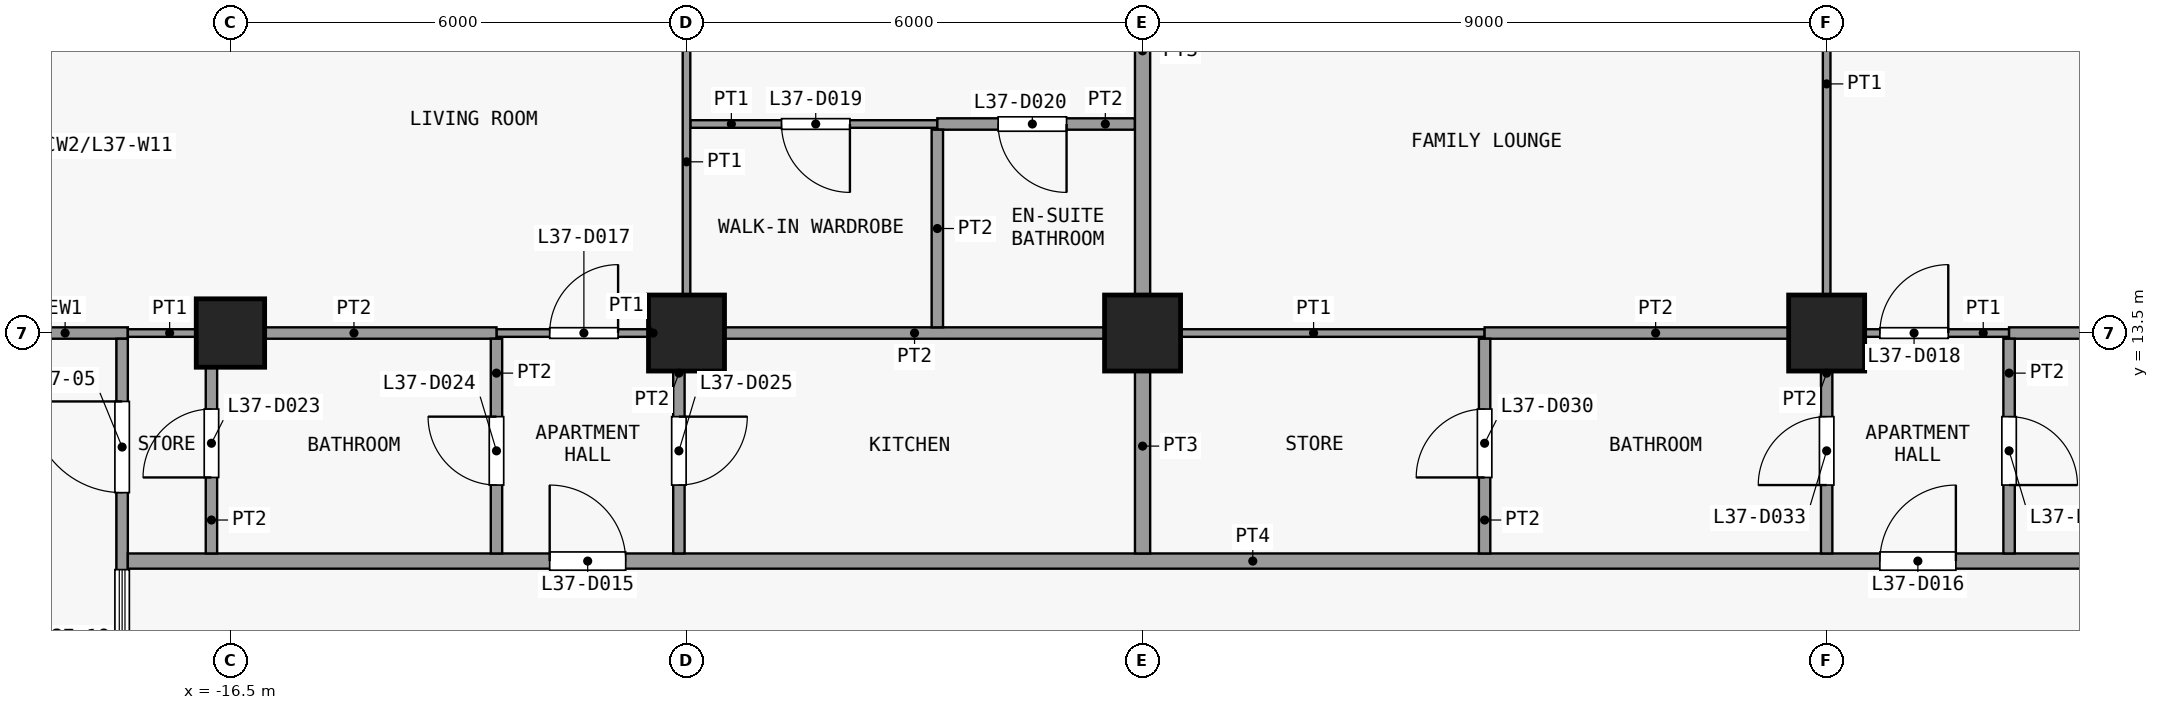
"""IFC4 building model, lengths in metres.
Left out: names, types, materials, properties, quantities, classifications, styles, units other than length and angle.
Written with IfcOpenShell. Run it as: python <this file> out.ifc"""

import sys

from ifc_helpers import new_model, si_unit, direction, frame, frame_2d, origin, origin_2d, place, context, subcontext, project, spatial, rectangle, extrude, element, fill, save


model = new_model("IFC4")
c1 = context("Model", 3, precision=1e-05, world=origin(), true_north=direction((0.0, 1.0)))
c2 = subcontext(c1, "Body", "Model", "MODEL_VIEW")
j1 = project(units=[si_unit("LENGTHUNIT", "METRE"), si_unit("PLANEANGLEUNIT", "RADIAN")], contexts=[c1])
p1 = place(None, origin())
s1 = spatial("IfcSite", under=j1, at=p1, CompositionType="ELEMENT")
p2 = place(p1, origin())
s2 = spatial("IfcBuilding", under=s1, at=p2, CompositionType="ELEMENT")
p3 = place(p2, frame((0.0, 0.0, 152.9)))
s3 = spatial("IfcBuildingStorey", under=s2, at=p3, CompositionType="ELEMENT", Elevation=152.9)
p4 = place(p3, frame((-16.5, 13.5, 0.0), z_axis=(0.0, 0.0, 1.0), x_axis=(1.0, 0.0, 0.0)))
e1 = element("IfcColumn", 1, at=p4, inside=s3, PredefinedType="COLUMN", context=c2, shape_type="SweptSolid", body=[
    extrude(rectangle(XDim=0.9, YDim=0.9, at=origin_2d()), origin(), (0.0, 0.0, 1.0), 3.6),
])
for number, where, z_axis, x_axis in (
    (2, (-10.5, 13.5, 0.0), (0.0, 0.0, 1.0), (1.0, 0.0, 0.0)),
    (3, (-4.5, 13.5, 0.0), (0.0, 0.0, 1.0), (1.0, 0.0, 0.0)),
    (4, (4.5, 13.5, 0.0), (0.0, 0.0, 1.0), (1.0, 0.0, 0.0)),
):
    element("IfcColumn", number, at=place(p3, frame(where, z_axis=z_axis, x_axis=x_axis)), inside=s3, PredefinedType="COLUMN", context=c2, shape_type="SweptSolid", body=[
        extrude(rectangle(XDim=1.0, YDim=1.0, at=origin_2d()), origin(), (0.0, 0.0, 1.0), 3.6),
    ])
p5 = place(p3, frame((-17.85, 13.5, 0.0), z_axis=(0.0, 0.0, 1.0), x_axis=(-1.0, 0.0, 0.0)))
e5 = element("IfcWall", 5, at=p5, inside=s3, PredefinedType="SOLIDWALL", context=c2, shape_type="SweptSolid", body=[
    extrude(rectangle(XDim=1.65, YDim=0.15, at=frame_2d((0.825, 0.0))), origin(), (0.0, 0.0, 1.0), 3.3),
])
p6 = place(p3, frame((-17.925, 7.575, 0.0), z_axis=(0.0, 0.0, 1.0), x_axis=(0.0, 1.0, 0.0)))
e6 = element("IfcWall", 6, at=p6, inside=s3, PredefinedType="SOLIDWALL", context=c2, shape_type="SweptSolid", body=[
    extrude(rectangle(XDim=5.85, YDim=0.15, at=frame_2d((2.925, 0.0))), origin(), (0.0, 0.0, 1.0), 3.3),
])
p7 = place(p6, frame((3.825, 0.0, 0.0)))
e7 = element("IfcOpeningElement", 7, at=p7, cuts=e6, PredefinedType="OPENING", context=c2, shape_type="SweptSolid", body=[
    extrude(rectangle(XDim=1.2, YDim=2.4, at=frame_2d((0.6, 1.2))), frame((0.0, 0.085, 0.0), z_axis=(0.0, -1.0, 0.0), x_axis=(1.0, 0.0, 0.0)), (0.0, 0.0, 1.0), 0.17),
])
p8 = place(p6, frame((1.012, 0.0, 0.9)))
e8 = element("IfcOpeningElement", 8, at=p8, cuts=e6, PredefinedType="OPENING", context=c2, shape_type="SweptSolid", body=[
    extrude(rectangle(XDim=1.8, YDim=2.1, at=frame_2d((0.9, 1.05))), frame((0.0, 0.085, 0.0), z_axis=(0.0, -1.0, 0.0), x_axis=(1.0, 0.0, 0.0)), (0.0, 0.0, 1.0), 0.17),
])
p9 = place(p3, frame((-17.85, 10.5, 0.0), z_axis=(0.0, 0.0, 1.0), x_axis=(1.0, 0.0, 0.0)))
e9 = element("IfcWall", 9, at=p9, inside=s3, PredefinedType="PARTITIONING", context=c2, shape_type="SweptSolid", body=[
    extrude(rectangle(XDim=37.2, YDim=0.2, at=frame_2d((18.6, 0.0))), origin(), (0.0, 0.0, 1.0), 3.3),
])
p10 = place(p9, frame((5.55, 0.0, 0.0)))
e10 = element("IfcOpeningElement", 10, at=p10, cuts=e9, PredefinedType="OPENING", context=c2, shape_type="SweptSolid", body=[
    extrude(rectangle(XDim=1.0, YDim=2.1, at=frame_2d((0.5, 1.05))), frame((0.0, 0.11, 0.0), z_axis=(0.0, -1.0, 0.0), x_axis=(1.0, 0.0, 0.0)), (0.0, 0.0, 1.0), 0.22),
])
p11 = place(p9, frame((23.05, 0.0, 0.0)))
e11 = element("IfcOpeningElement", 11, at=p11, cuts=e9, PredefinedType="OPENING", context=c2, shape_type="SweptSolid", body=[
    extrude(rectangle(XDim=1.0, YDim=2.1, at=frame_2d((0.5, 1.05))), frame((0.0, 0.11, 0.0), z_axis=(0.0, -1.0, 0.0), x_axis=(1.0, 0.0, 0.0)), (0.0, 0.0, 1.0), 0.22),
])
p12 = place(p3, frame((-17.85, 13.5, 0.0), z_axis=(0.0, 0.0, 1.0), x_axis=(1.0, 0.0, 0.0)))
e12 = element("IfcWall", 12, at=p12, inside=s3, PredefinedType="PARTITIONING", context=c2, shape_type="SweptSolid", body=[
    extrude(rectangle(XDim=1.1, YDim=0.1, at=frame_2d((0.55, 0.0))), origin(), (0.0, 0.0, 1.0), 3.3),
])
p13 = place(p3, frame((-13.0, 13.5, 0.0), z_axis=(0.0, 0.0, 1.0), x_axis=(1.0, 0.0, 0.0)))
e13 = element("IfcWall", 13, at=p13, inside=s3, PredefinedType="PARTITIONING", context=c2, shape_type="SweptSolid", body=[
    extrude(rectangle(XDim=2.4, YDim=0.1, at=frame_2d((1.2, 0.0))), origin(), (0.0, 0.0, 1.0), 3.3),
])
p14 = place(p13, frame((0.7, 0.0, 0.0)))
e14 = element("IfcOpeningElement", 14, at=p14, cuts=e13, PredefinedType="OPENING", context=c2, shape_type="SweptSolid", body=[
    extrude(rectangle(XDim=0.9, YDim=2.1, at=frame_2d((0.45, 1.05))), frame((0.0, 0.06, 0.0), z_axis=(0.0, -1.0, 0.0), x_axis=(1.0, 0.0, 0.0)), (0.0, 0.0, 1.0), 0.12),
])
p15 = place(p3, frame((-4.5, 13.5, 0.0), z_axis=(0.0, 0.0, 1.0), x_axis=(1.0, 0.0, 0.0)))
e15 = element("IfcWall", 15, at=p15, inside=s3, PredefinedType="PARTITIONING", context=c2, shape_type="SweptSolid", body=[
    extrude(rectangle(XDim=4.5, YDim=0.1, at=frame_2d((2.25, 0.0))), origin(), (0.0, 0.0, 1.0), 3.3),
])
p16 = place(p3, frame((4.5, 13.5, 0.0), z_axis=(0.0, 0.0, 1.0), x_axis=(1.0, 0.0, 0.0)))
e16 = element("IfcWall", 16, at=p16, inside=s3, PredefinedType="PARTITIONING", context=c2, shape_type="SweptSolid", body=[
    extrude(rectangle(XDim=2.4, YDim=0.1, at=frame_2d((1.2, 0.0))), origin(), (0.0, 0.0, 1.0), 3.3),
])
p17 = place(p16, frame((0.7, 0.0, 0.0)))
e17 = element("IfcOpeningElement", 17, at=p17, cuts=e16, PredefinedType="OPENING", context=c2, shape_type="SweptSolid", body=[
    extrude(rectangle(XDim=0.9, YDim=2.1, at=frame_2d((0.45, 1.05))), frame((0.0, 0.06, 0.0), z_axis=(0.0, -1.0, 0.0), x_axis=(1.0, 0.0, 0.0)), (0.0, 0.0, 1.0), 0.12),
])
p18 = place(p3, frame((-16.75, 13.5, 0.0), z_axis=(0.0, 0.0, 1.0), x_axis=(1.0, 0.0, 0.0)))
e18 = element("IfcWall", 18, at=p18, inside=s3, PredefinedType="PARTITIONING", context=c2, shape_type="SweptSolid", body=[
    extrude(rectangle(XDim=3.75, YDim=0.15, at=frame_2d((1.875, 0.0))), origin(), (0.0, 0.0, 1.0), 3.3),
])
p19 = place(p3, frame((-10.5, 13.5, 0.0), z_axis=(0.0, 0.0, 1.0), x_axis=(1.0, 0.0, 0.0)))
e19 = element("IfcWall", 19, at=p19, inside=s3, PredefinedType="PARTITIONING", context=c2, shape_type="SweptSolid", body=[
    extrude(rectangle(XDim=6.0, YDim=0.15, at=frame_2d((3.0, 0.0))), origin(), (0.0, 0.0, 1.0), 3.3),
])
p20 = place(p3, frame((0.0, 13.5, 0.0), z_axis=(0.0, 0.0, 1.0), x_axis=(1.0, 0.0, 0.0)))
e20 = element("IfcWall", 20, at=p20, inside=s3, PredefinedType="PARTITIONING", context=c2, shape_type="SweptSolid", body=[
    extrude(rectangle(XDim=4.5, YDim=0.15, at=frame_2d((2.25, 0.0))), origin(), (0.0, 0.0, 1.0), 3.3),
])
p21 = place(p3, frame((6.9, 13.5, 0.0), z_axis=(0.0, 0.0, 1.0), x_axis=(1.0, 0.0, 0.0)))
e21 = element("IfcWall", 21, at=p21, inside=s3, PredefinedType="PARTITIONING", context=c2, shape_type="SweptSolid", body=[
    extrude(rectangle(XDim=10.3, YDim=0.15, at=frame_2d((5.15, 0.0))), origin(), (0.0, 0.0, 1.0), 3.3),
])
p22 = place(p3, frame((-10.45, 16.25, 0.0), z_axis=(0.0, 0.0, 1.0), x_axis=(1.0, 0.0, 0.0)))
e22 = element("IfcWall", 22, at=p22, inside=s3, PredefinedType="PARTITIONING", context=c2, shape_type="SweptSolid", body=[
    extrude(rectangle(XDim=3.25, YDim=0.1, at=frame_2d((1.625, 0.0))), origin(), (0.0, 0.0, 1.0), 3.3),
])
p23 = place(p22, frame((1.2, 0.0, 0.0)))
e23 = element("IfcOpeningElement", 23, at=p23, cuts=e22, PredefinedType="OPENING", context=c2, shape_type="SweptSolid", body=[
    extrude(rectangle(XDim=0.9, YDim=2.1, at=frame_2d((0.45, 1.05))), frame((0.0, 0.06, 0.0), z_axis=(0.0, -1.0, 0.0), x_axis=(1.0, 0.0, 0.0)), (0.0, 0.0, 1.0), 0.12),
])
p24 = place(p3, frame((-7.2, 16.25, 0.0), z_axis=(0.0, 0.0, 1.0), x_axis=(1.0, 0.0, 0.0)))
e24 = element("IfcWall", 24, at=p24, inside=s3, PredefinedType="PARTITIONING", context=c2, shape_type="SweptSolid", body=[
    extrude(rectangle(XDim=2.6, YDim=0.15, at=frame_2d((1.3, 0.0))), origin(), (0.0, 0.0, 1.0), 3.3),
])
p25 = place(p24, frame((0.8, 0.0, 0.0)))
e25 = element("IfcOpeningElement", 25, at=p25, cuts=e24, PredefinedType="OPENING", context=c2, shape_type="SweptSolid", body=[
    extrude(rectangle(XDim=0.9, YDim=2.1, at=frame_2d((0.45, 1.05))), frame((0.0, 0.085, 0.0), z_axis=(0.0, -1.0, 0.0), x_axis=(1.0, 0.0, 0.0)), (0.0, 0.0, 1.0), 0.17),
])
p26 = place(p3, frame((-16.75, 10.6, 0.0), z_axis=(0.0, 0.0, 1.0), x_axis=(0.0, 1.0, 0.0)))
e26 = element("IfcWall", 26, at=p26, inside=s3, PredefinedType="PARTITIONING", context=c2, shape_type="SweptSolid", body=[
    extrude(rectangle(XDim=2.825, YDim=0.15, at=frame_2d((1.413, 0.0))), origin(), (0.0, 0.0, 1.0), 3.3),
])
p27 = place(p26, frame((1.0, 0.0, 0.0)))
e27 = element("IfcOpeningElement", 27, at=p27, cuts=e26, PredefinedType="OPENING", context=c2, shape_type="SweptSolid", body=[
    extrude(rectangle(XDim=0.9, YDim=2.1, at=frame_2d((0.45, 1.05))), frame((0.0, 0.085, 0.0), z_axis=(0.0, -1.0, 0.0), x_axis=(1.0, 0.0, 0.0)), (0.0, 0.0, 1.0), 0.17),
])
p28 = place(p3, frame((-13.0, 10.6, 0.0), z_axis=(0.0, 0.0, 1.0), x_axis=(0.0, 1.0, 0.0)))
e28 = element("IfcWall", 28, at=p28, inside=s3, PredefinedType="PARTITIONING", context=c2, shape_type="SweptSolid", body=[
    extrude(rectangle(XDim=2.825, YDim=0.15, at=frame_2d((1.413, 0.0))), origin(), (0.0, 0.0, 1.0), 3.3),
])
p29 = place(p28, frame((0.9, 0.0, 0.0)))
e29 = element("IfcOpeningElement", 29, at=p29, cuts=e28, PredefinedType="OPENING", context=c2, shape_type="SweptSolid", body=[
    extrude(rectangle(XDim=0.9, YDim=2.1, at=frame_2d((0.45, 1.05))), frame((0.0, 0.085, 0.0), z_axis=(0.0, -1.0, 0.0), x_axis=(1.0, 0.0, 0.0)), (0.0, 0.0, 1.0), 0.17),
])
p30 = place(p3, frame((-10.6, 10.6, 0.0), z_axis=(0.0, 0.0, 1.0), x_axis=(0.0, 1.0, 0.0)))
e30 = element("IfcWall", 30, at=p30, inside=s3, PredefinedType="PARTITIONING", context=c2, shape_type="SweptSolid", body=[
    extrude(rectangle(XDim=2.825, YDim=0.15, at=frame_2d((1.413, 0.0))), origin(), (0.0, 0.0, 1.0), 3.3),
])
p31 = place(p30, frame((0.9, 0.0, 0.0)))
e31 = element("IfcOpeningElement", 31, at=p31, cuts=e30, PredefinedType="OPENING", context=c2, shape_type="SweptSolid", body=[
    extrude(rectangle(XDim=0.9, YDim=2.1, at=frame_2d((0.45, 1.05))), frame((0.0, 0.085, 0.0), z_axis=(0.0, -1.0, 0.0), x_axis=(1.0, 0.0, 0.0)), (0.0, 0.0, 1.0), 0.17),
])
p32 = place(p3, frame((-10.5, 13.575, 0.0), z_axis=(0.0, 0.0, 1.0), x_axis=(0.0, 1.0, 0.0)))
e32 = element("IfcWall", 32, at=p32, inside=s3, PredefinedType="PARTITIONING", context=c2, shape_type="SweptSolid", body=[
    extrude(rectangle(XDim=7.275, YDim=0.1, at=frame_2d((3.638, 0.0))), origin(), (0.0, 0.0, 1.0), 3.3),
])
p33 = place(p32, frame((4.475, 0.0, 0.0)))
e33 = element("IfcOpeningElement", 33, at=p33, cuts=e32, PredefinedType="OPENING", context=c2, shape_type="SweptSolid", body=[
    extrude(rectangle(XDim=0.9, YDim=2.1, at=frame_2d((0.45, 1.05))), frame((0.0, 0.06, 0.0), z_axis=(0.0, -1.0, 0.0), x_axis=(1.0, 0.0, 0.0)), (0.0, 0.0, 1.0), 0.12),
])
p34 = place(p3, frame((-7.2, 13.575, 0.0), z_axis=(0.0, 0.0, 1.0), x_axis=(0.0, 1.0, 0.0)))
e34 = element("IfcWall", 34, at=p34, inside=s3, PredefinedType="PARTITIONING", context=c2, shape_type="SweptSolid", body=[
    extrude(rectangle(XDim=2.6, YDim=0.15, at=frame_2d((1.3, 0.0))), origin(), (0.0, 0.0, 1.0), 3.3),
])
p35 = place(p3, frame((-4.5, 10.6, 0.0), z_axis=(0.0, 0.0, 1.0), x_axis=(0.0, 1.0, 0.0)))
e35 = element("IfcWall", 35, at=p35, inside=s3, PredefinedType="PARTITIONING", context=c2, shape_type="SweptSolid", body=[
    extrude(rectangle(XDim=2.825, YDim=0.2, at=frame_2d((1.413, 0.0))), origin(), (0.0, 0.0, 1.0), 3.3),
])
p36 = place(p3, frame((-4.5, 13.575, 0.0), z_axis=(0.0, 0.0, 1.0), x_axis=(0.0, 1.0, 0.0)))
e36 = element("IfcWall", 36, at=p36, inside=s3, PredefinedType="PARTITIONING", context=c2, shape_type="SweptSolid", body=[
    extrude(rectangle(XDim=7.275, YDim=0.2, at=frame_2d((3.638, 0.0))), origin(), (0.0, 0.0, 1.0), 3.3),
])
p37 = place(p3, frame((0.0, 10.6, 0.0), z_axis=(0.0, 0.0, 1.0), x_axis=(0.0, 1.0, 0.0)))
e37 = element("IfcWall", 37, at=p37, inside=s3, PredefinedType="PARTITIONING", context=c2, shape_type="SweptSolid", body=[
    extrude(rectangle(XDim=2.825, YDim=0.15, at=frame_2d((1.413, 0.0))), origin(), (0.0, 0.0, 1.0), 3.3),
])
p38 = place(p37, frame((1.0, 0.0, 0.0)))
e38 = element("IfcOpeningElement", 38, at=p38, cuts=e37, PredefinedType="OPENING", context=c2, shape_type="SweptSolid", body=[
    extrude(rectangle(XDim=0.9, YDim=2.1, at=frame_2d((0.45, 1.05))), frame((0.0, 0.085, 0.0), z_axis=(0.0, -1.0, 0.0), x_axis=(1.0, 0.0, 0.0)), (0.0, 0.0, 1.0), 0.17),
])
p39 = place(p3, frame((4.5, 13.575, 0.0), z_axis=(0.0, 0.0, 1.0), x_axis=(0.0, 1.0, 0.0)))
e39 = element("IfcWall", 39, at=p39, inside=s3, PredefinedType="PARTITIONING", context=c2, shape_type="SweptSolid", body=[
    extrude(rectangle(XDim=8.688, YDim=0.1, at=frame_2d((4.344, 0.0))), origin(), (0.0, 0.0, 1.0), 3.3),
])
p40 = place(p39, frame((6.525, 0.0, 0.0)))
e40 = element("IfcOpeningElement", 40, at=p40, cuts=e39, PredefinedType="OPENING", context=c2, shape_type="SweptSolid", body=[
    extrude(rectangle(XDim=0.9, YDim=2.1, at=frame_2d((0.45, 1.05))), frame((0.0, 0.06, 0.0), z_axis=(0.0, -1.0, 0.0), x_axis=(1.0, 0.0, 0.0)), (0.0, 0.0, 1.0), 0.12),
])
p41 = place(p3, frame((4.5, 10.6, 0.0), z_axis=(0.0, 0.0, 1.0), x_axis=(0.0, 1.0, 0.0)))
e41 = element("IfcWall", 41, at=p41, inside=s3, PredefinedType="PARTITIONING", context=c2, shape_type="SweptSolid", body=[
    extrude(rectangle(XDim=2.825, YDim=0.15, at=frame_2d((1.413, 0.0))), origin(), (0.0, 0.0, 1.0), 3.3),
])
p42 = place(p41, frame((0.9, 0.0, 0.0)))
e42 = element("IfcOpeningElement", 42, at=p42, cuts=e41, PredefinedType="OPENING", context=c2, shape_type="SweptSolid", body=[
    extrude(rectangle(XDim=0.9, YDim=2.1, at=frame_2d((0.45, 1.05))), frame((0.0, 0.085, 0.0), z_axis=(0.0, -1.0, 0.0), x_axis=(1.0, 0.0, 0.0)), (0.0, 0.0, 1.0), 0.17),
])
p43 = place(p3, frame((6.9, 10.6, 0.0), z_axis=(0.0, 0.0, 1.0), x_axis=(0.0, 1.0, 0.0)))
e43 = element("IfcWall", 43, at=p43, inside=s3, PredefinedType="PARTITIONING", context=c2, shape_type="SweptSolid", body=[
    extrude(rectangle(XDim=2.825, YDim=0.15, at=frame_2d((1.413, 0.0))), origin(), (0.0, 0.0, 1.0), 3.3),
])
p44 = place(p43, frame((0.9, 0.0, 0.0)))
e44 = element("IfcOpeningElement", 44, at=p44, cuts=e43, PredefinedType="OPENING", context=c2, shape_type="SweptSolid", body=[
    extrude(rectangle(XDim=0.9, YDim=2.1, at=frame_2d((0.45, 1.05))), frame((0.0, 0.085, 0.0), z_axis=(0.0, -1.0, 0.0), x_axis=(1.0, 0.0, 0.0)), (0.0, 0.0, 1.0), 0.17),
])
p45 = place(p7, origin())
e45 = element("IfcDoor", 45, at=p45, inside=s3, OperationType="SINGLE_SWING_RIGHT", PredefinedType="DOOR", context=c2, shape_type="SweptSolid", body=[
    extrude(rectangle(XDim=1.2, YDim=2.4, at=frame_2d((0.6, 1.2))), frame((0.0, 0.025, 0.0), z_axis=(0.0, -1.0, 0.0), x_axis=(1.0, 0.0, 0.0)), (0.0, 0.0, 1.0), 0.05),
])
fill(e7, e45)
p46 = place(p8, origin())
e46 = element("IfcWindow", 46, at=p46, inside=s3, PartitioningType="SINGLE_PANEL", PredefinedType="WINDOW", context=c2, shape_type="SweptSolid", body=[
    extrude(rectangle(XDim=1.8, YDim=2.1, at=frame_2d((0.9, 1.05))), frame((0.0, 0.03, 0.0), z_axis=(0.0, -1.0, 0.0), x_axis=(1.0, 0.0, 0.0)), (0.0, 0.0, 1.0), 0.06),
])
fill(e8, e46)
p47 = place(p10, origin())
e47 = element("IfcDoor", 47, at=p47, inside=s3, OperationType="SINGLE_SWING_RIGHT", PredefinedType="DOOR", context=c2, shape_type="SweptSolid", body=[
    extrude(rectangle(XDim=1.0, YDim=2.1, at=frame_2d((0.5, 1.05))), frame((0.0, 0.025, 0.0), z_axis=(0.0, -1.0, 0.0), x_axis=(1.0, 0.0, 0.0)), (0.0, 0.0, 1.0), 0.05),
])
fill(e10, e47)
p48 = place(p11, origin())
e48 = element("IfcDoor", 48, at=p48, inside=s3, OperationType="SINGLE_SWING_LEFT", PredefinedType="DOOR", context=c2, shape_type="SweptSolid", body=[
    extrude(rectangle(XDim=1.0, YDim=2.1, at=frame_2d((0.5, 1.05))), frame((0.0, 0.025, 0.0), z_axis=(0.0, -1.0, 0.0), x_axis=(1.0, 0.0, 0.0)), (0.0, 0.0, 1.0), 0.05),
])
fill(e11, e48)
p49 = place(p14, origin())
e49 = element("IfcDoor", 49, at=p49, inside=s3, OperationType="SINGLE_SWING_LEFT", PredefinedType="DOOR", context=c2, shape_type="SweptSolid", body=[
    extrude(rectangle(XDim=0.9, YDim=2.1, at=frame_2d((0.45, 1.05))), frame((0.0, 0.025, 0.0), z_axis=(0.0, -1.0, 0.0), x_axis=(1.0, 0.0, 0.0)), (0.0, 0.0, 1.0), 0.05),
])
fill(e14, e49)
p50 = place(p17, origin())
e50 = element("IfcDoor", 50, at=p50, inside=s3, OperationType="SINGLE_SWING_LEFT", PredefinedType="DOOR", context=c2, shape_type="SweptSolid", body=[
    extrude(rectangle(XDim=0.9, YDim=2.1, at=frame_2d((0.45, 1.05))), frame((0.0, 0.025, 0.0), z_axis=(0.0, -1.0, 0.0), x_axis=(1.0, 0.0, 0.0)), (0.0, 0.0, 1.0), 0.05),
])
fill(e17, e50)
p51 = place(p23, origin())
e51 = element("IfcDoor", 51, at=p51, inside=s3, OperationType="SINGLE_SWING_RIGHT", PredefinedType="DOOR", context=c2, shape_type="SweptSolid", body=[
    extrude(rectangle(XDim=0.9, YDim=2.1, at=frame_2d((0.45, 1.05))), frame((0.0, 0.025, 0.0), z_axis=(0.0, -1.0, 0.0), x_axis=(1.0, 0.0, 0.0)), (0.0, 0.0, 1.0), 0.05),
])
fill(e23, e51)
p52 = place(p25, origin())
e52 = element("IfcDoor", 52, at=p52, inside=s3, OperationType="SINGLE_SWING_RIGHT", PredefinedType="DOOR", context=c2, shape_type="SweptSolid", body=[
    extrude(rectangle(XDim=0.9, YDim=2.1, at=frame_2d((0.45, 1.05))), frame((0.0, 0.025, 0.0), z_axis=(0.0, -1.0, 0.0), x_axis=(1.0, 0.0, 0.0)), (0.0, 0.0, 1.0), 0.05),
])
fill(e25, e52)
p53 = place(p27, origin())
e53 = element("IfcDoor", 53, at=p53, inside=s3, OperationType="SINGLE_SWING_RIGHT", PredefinedType="DOOR", context=c2, shape_type="SweptSolid", body=[
    extrude(rectangle(XDim=0.9, YDim=2.1, at=frame_2d((0.45, 1.05))), frame((0.0, 0.025, 0.0), z_axis=(0.0, -1.0, 0.0), x_axis=(1.0, 0.0, 0.0)), (0.0, 0.0, 1.0), 0.05),
])
fill(e27, e53)
p54 = place(p29, origin())
e54 = element("IfcDoor", 54, at=p54, inside=s3, OperationType="SINGLE_SWING_LEFT", PredefinedType="DOOR", context=c2, shape_type="SweptSolid", body=[
    extrude(rectangle(XDim=0.9, YDim=2.1, at=frame_2d((0.45, 1.05))), frame((0.0, 0.025, 0.0), z_axis=(0.0, -1.0, 0.0), x_axis=(1.0, 0.0, 0.0)), (0.0, 0.0, 1.0), 0.05),
])
fill(e29, e54)
p55 = place(p31, origin())
e55 = element("IfcDoor", 55, at=p55, inside=s3, OperationType="SINGLE_SWING_RIGHT", PredefinedType="DOOR", context=c2, shape_type="SweptSolid", body=[
    extrude(rectangle(XDim=0.9, YDim=2.1, at=frame_2d((0.45, 1.05))), frame((0.0, 0.025, 0.0), z_axis=(0.0, -1.0, 0.0), x_axis=(1.0, 0.0, 0.0)), (0.0, 0.0, 1.0), 0.05),
])
fill(e31, e55)
p56 = place(p38, origin())
e56 = element("IfcDoor", 56, at=p56, inside=s3, OperationType="SINGLE_SWING_RIGHT", PredefinedType="DOOR", context=c2, shape_type="SweptSolid", body=[
    extrude(rectangle(XDim=0.9, YDim=2.1, at=frame_2d((0.45, 1.05))), frame((0.0, 0.025, 0.0), z_axis=(0.0, -1.0, 0.0), x_axis=(1.0, 0.0, 0.0)), (0.0, 0.0, 1.0), 0.05),
])
fill(e38, e56)
p57 = place(p42, origin())
e57 = element("IfcDoor", 57, at=p57, inside=s3, OperationType="SINGLE_SWING_RIGHT", PredefinedType="DOOR", context=c2, shape_type="SweptSolid", body=[
    extrude(rectangle(XDim=0.9, YDim=2.1, at=frame_2d((0.45, 1.05))), frame((0.0, 0.025, 0.0), z_axis=(0.0, -1.0, 0.0), x_axis=(1.0, 0.0, 0.0)), (0.0, 0.0, 1.0), 0.05),
])
fill(e42, e57)
p58 = place(p44, origin())
e58 = element("IfcDoor", 58, at=p58, inside=s3, OperationType="SINGLE_SWING_LEFT", PredefinedType="DOOR", context=c2, shape_type="SweptSolid", body=[
    extrude(rectangle(XDim=0.9, YDim=2.1, at=frame_2d((0.45, 1.05))), frame((0.0, 0.025, 0.0), z_axis=(0.0, -1.0, 0.0), x_axis=(1.0, 0.0, 0.0)), (0.0, 0.0, 1.0), 0.05),
])
fill(e44, e58)
save(model, sys.argv[1])
